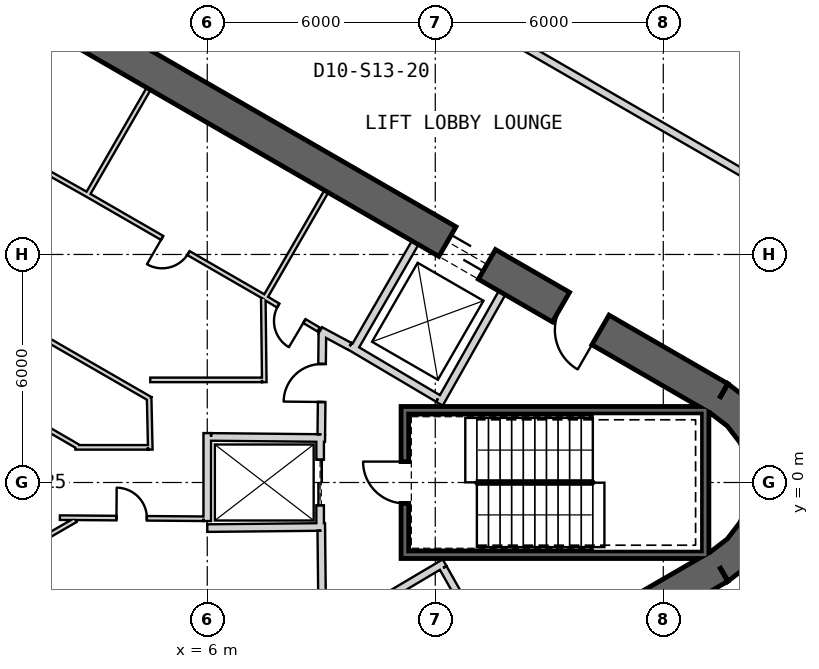
"""IFC4 building model, lengths in metres.
Left out: names, types, materials, properties, quantities, classifications, styles, units other than length and angle.
Written with IfcOpenShell. Run it as: python <this file> out.ifc"""

import sys

from ifc_helpers import new_model, si_unit, direction, frame, frame_2d, origin, place, context, subcontext, project, spatial, polyline, rectangle, outline, extrude, element, fill, save


model = new_model("IFC4")
c1 = context("Model", 3, precision=1e-05, world=origin(), true_north=direction((0.0, 1.0)))
c2 = subcontext(c1, "Body", "Model", "MODEL_VIEW")
j1 = project(units=[si_unit("LENGTHUNIT", "METRE"), si_unit("PLANEANGLEUNIT", "RADIAN")], contexts=[c1])
p1 = place(None, origin())
s1 = spatial("IfcSite", under=j1, at=p1, CompositionType="ELEMENT")
p2 = place(p1, origin())
s2 = spatial("IfcBuilding", under=s1, at=p2, CompositionType="ELEMENT")
p3 = place(p2, frame((0.0, 0.0, 217.2)))
s3 = spatial("IfcBuildingStorey", under=s2, at=p3, CompositionType="ELEMENT", Elevation=217.2)
p4 = place(p3, frame((19.475, 2.208, 0.0), z_axis=(0.0, 0.0, 1.0), x_axis=(-0.866028369851, 0.499994862586, 0.0)))
e1 = element("IfcWall", 1, at=p4, inside=s3, PredefinedType="SHEAR", context=c2, shape_type="SweptSolid", body=[
    extrude(rectangle(XDim=31.523, YDim=0.9, at=frame_2d((15.762, 0.0))), origin(), (0.0, 0.0, 1.0), 4.0),
])
p5 = place(p4, frame((7.062, 0.0, 0.0)))
e2 = element("IfcOpeningElement", 2, at=p5, cuts=e1, PredefinedType="OPENING", context=c2, shape_type="SweptSolid", body=[
    extrude(rectangle(XDim=1.2, YDim=2.4, at=frame_2d((0.6, 1.2))), frame((0.0, 0.46, 0.0), z_axis=(0.0, -1.0, 0.0), x_axis=(1.0, 0.0, 0.0)), (0.0, 0.0, 1.0), 0.92),
])
p6 = place(p4, frame((3.612, 0.0, 0.0)))
e3 = element("IfcOpeningElement", 3, at=p6, cuts=e1, PredefinedType="OPENING", context=c2, shape_type="SweptSolid", body=[
    extrude(rectangle(XDim=1.2, YDim=2.4, at=frame_2d((0.6, 1.2))), frame((0.0, 0.46, 0.0), z_axis=(0.0, -1.0, 0.0), x_axis=(1.0, 0.0, 0.0)), (0.0, 0.0, 1.0), 0.92),
])
p7 = place(p4, frame((26.712, 0.0, 0.0)))
e4 = element("IfcOpeningElement", 4, at=p7, cuts=e1, PredefinedType="OPENING", context=c2, shape_type="SweptSolid", body=[
    extrude(rectangle(XDim=1.2, YDim=2.4, at=frame_2d((0.6, 1.2))), frame((0.0, 0.46, 0.0), z_axis=(0.0, -1.0, 0.0), x_axis=(1.0, 0.0, 0.0)), (0.0, 0.0, 1.0), 0.92),
])
p8 = place(p3, frame((-7.825, -17.97, 0.0), z_axis=(0.0, 0.0, 1.0), x_axis=(0.866028369851, 0.499994862586, 0.0)))
e5 = element("IfcWall", 5, at=p8, inside=s3, PredefinedType="SHEAR", context=c2, shape_type="SweptSolid", body=[
    extrude(rectangle(XDim=31.523, YDim=0.9, at=frame_2d((15.762, 0.0))), origin(), (0.0, 0.0, 1.0), 4.0),
])
p9 = place(p8, frame((7.062, 0.0, 0.0)))
e6 = element("IfcOpeningElement", 6, at=p9, cuts=e5, PredefinedType="OPENING", context=c2, shape_type="SweptSolid", body=[
    extrude(rectangle(XDim=1.2, YDim=2.4, at=frame_2d((0.6, 1.2))), frame((0.0, 0.46, 0.0), z_axis=(0.0, -1.0, 0.0), x_axis=(1.0, 0.0, 0.0)), (0.0, 0.0, 1.0), 0.92),
])
p10 = place(p8, frame((9.762, 0.0, 0.0)))
e7 = element("IfcOpeningElement", 7, at=p10, cuts=e5, PredefinedType="OPENING", context=c2, shape_type="SweptSolid", body=[
    extrude(rectangle(XDim=1.2, YDim=2.4, at=frame_2d((0.6, 1.2))), frame((0.0, 0.46, 0.0), z_axis=(0.0, -1.0, 0.0), x_axis=(1.0, 0.0, 0.0)), (0.0, 0.0, 1.0), 0.92),
])
p11 = place(p8, frame((12.462, 0.0, 0.0)))
e8 = element("IfcOpeningElement", 8, at=p11, cuts=e5, PredefinedType="OPENING", context=c2, shape_type="SweptSolid", body=[
    extrude(rectangle(XDim=1.2, YDim=2.4, at=frame_2d((0.6, 1.2))), frame((0.0, 0.46, 0.0), z_axis=(0.0, -1.0, 0.0), x_axis=(1.0, 0.0, 0.0)), (0.0, 0.0, 1.0), 0.92),
])
p12 = place(p8, frame((15.162, 0.0, 0.0)))
e9 = element("IfcOpeningElement", 9, at=p12, cuts=e5, PredefinedType="OPENING", context=c2, shape_type="SweptSolid", body=[
    extrude(rectangle(XDim=1.2, YDim=2.4, at=frame_2d((0.6, 1.2))), frame((0.0, 0.46, 0.0), z_axis=(0.0, -1.0, 0.0), x_axis=(1.0, 0.0, 0.0)), (0.0, 0.0, 1.0), 0.92),
])
p13 = place(p8, frame((17.862, 0.0, 0.0)))
e10 = element("IfcOpeningElement", 10, at=p13, cuts=e5, PredefinedType="OPENING", context=c2, shape_type="SweptSolid", body=[
    extrude(rectangle(XDim=1.2, YDim=2.4, at=frame_2d((0.6, 1.2))), frame((0.0, 0.46, 0.0), z_axis=(0.0, -1.0, 0.0), x_axis=(1.0, 0.0, 0.0)), (0.0, 0.0, 1.0), 0.92),
])
p14 = place(p8, frame((20.562, 0.0, 0.0)))
e11 = element("IfcOpeningElement", 11, at=p14, cuts=e5, PredefinedType="OPENING", context=c2, shape_type="SweptSolid", body=[
    extrude(rectangle(XDim=1.2, YDim=2.4, at=frame_2d((0.6, 1.2))), frame((0.0, 0.46, 0.0), z_axis=(0.0, -1.0, 0.0), x_axis=(1.0, 0.0, 0.0)), (0.0, 0.0, 1.0), 0.92),
])
p15 = place(p8, frame((26.712, 0.0, 0.0)))
e12 = element("IfcOpeningElement", 12, at=p15, cuts=e5, PredefinedType="OPENING", context=c2, shape_type="SweptSolid", body=[
    extrude(rectangle(XDim=1.2, YDim=2.4, at=frame_2d((0.6, 1.2))), frame((0.0, 0.46, 0.0), z_axis=(0.0, -1.0, 0.0), x_axis=(1.0, 0.0, 0.0)), (0.0, 0.0, 1.0), 0.92),
])
p16 = place(p8, frame((3.612, 0.0, 0.0)))
e13 = element("IfcOpeningElement", 13, at=p16, cuts=e5, PredefinedType="OPENING", context=c2, shape_type="SweptSolid", body=[
    extrude(rectangle(XDim=1.2, YDim=2.4, at=frame_2d((0.6, 1.2))), frame((0.0, 0.46, 0.0), z_axis=(0.0, -1.0, 0.0), x_axis=(1.0, 0.0, 0.0)), (0.0, 0.0, 1.0), 0.92),
])
p17 = place(p3, origin())
e14 = element("IfcWall", 14, at=p17, inside=s3, PredefinedType="SHEAR", context=c2, shape_type="SweptSolid", body=[
    extrude(outline(polyline([(19.7, -2.598), (20.321, -2.121), (20.798, -1.5), (21.098, -0.777), (21.2, 0.0), (21.098, 0.777), (20.798, 1.5), (20.321, 2.121), (19.7, 2.598), (19.25, 1.819), (19.685, 1.485), (20.019, 1.05), (20.229, 0.543), (20.3, 0.0), (20.229, -0.543), (20.019, -1.05), (19.685, -1.485), (19.25, -1.819), (19.7, -2.598)])), origin(), (0.0, 0.0, 1.0), 4.0),
])
p18 = place(p3, frame((9.847, 3.495, 0.0), z_axis=(0.0, 0.0, 1.0), x_axis=(0.499984717929, 0.866034226713, 0.0)))
e15 = element("IfcWall", 15, at=p18, inside=s3, PredefinedType="PLUMBINGWALL", context=c2, shape_type="SweptSolid", body=[
    extrude(rectangle(XDim=3.25, YDim=0.2, at=frame_2d((1.625, 0.0))), origin(), (0.0, 0.0, 1.0), 3.7),
])
p19 = place(p3, frame((12.11, 2.073, 0.0), z_axis=(0.0, 0.0, 1.0), x_axis=(0.49196600604, 0.870614408852, 0.0)))
e16 = element("IfcWall", 16, at=p19, inside=s3, PredefinedType="PLUMBINGWALL", context=c2, shape_type="SweptSolid", body=[
    extrude(rectangle(XDim=3.35, YDim=0.2, at=frame_2d((1.675, 0.0))), origin(), (0.0, 0.0, 1.0), 3.7),
])
p20 = place(p3, frame((12.073, 2.211, 0.0), z_axis=(0.0, 0.0, 1.0), x_axis=(-0.860414880418, 0.509594185166, 0.0)))
e17 = element("IfcWall", 17, at=p20, inside=s3, PredefinedType="PLUMBINGWALL", context=c2, shape_type="SweptSolid", body=[
    extrude(rectangle(XDim=2.7, YDim=0.2, at=frame_2d((1.35, 0.0))), origin(), (0.0, 0.0, 1.0), 3.7),
])
p21 = place(p3, frame((19.2, 1.9, -0.3), z_axis=(0.0, 0.0, 1.0), x_axis=(-1.0, 0.0, 0.0)))
e18 = element("IfcWall", 18, at=p21, inside=s3, PredefinedType="SHEAR", context=c2, shape_type="SweptSolid", body=[
    extrude(rectangle(XDim=8.1, YDim=0.2, at=frame_2d((4.05, 0.0))), origin(), (0.0, 0.0, 1.0), 4.0),
])
p22 = place(p3, frame((19.1, -2.0, -0.3), z_axis=(0.0, 0.0, 1.0), x_axis=(0.0, 1.0, 0.0)))
e19 = element("IfcWall", 19, at=p22, inside=s3, PredefinedType="SHEAR", context=c2, shape_type="SweptSolid", body=[
    extrude(rectangle(XDim=3.8, YDim=0.2, at=frame_2d((1.9, 0.0))), origin(), (0.0, 0.0, 1.0), 4.0),
])
p23 = place(p3, frame((11.1, -1.9, -0.3), z_axis=(0.0, 0.0, 1.0), x_axis=(1.0, 0.0, 0.0)))
e20 = element("IfcWall", 20, at=p23, inside=s3, PredefinedType="SHEAR", context=c2, shape_type="SweptSolid", body=[
    extrude(rectangle(XDim=7.9, YDim=0.2, at=frame_2d((3.95, 0.0))), origin(), (0.0, 0.0, 1.0), 4.0),
])
p24 = place(p3, frame((11.2, -1.8, -0.3), z_axis=(0.0, 0.0, 1.0), x_axis=(0.0, 1.0, 0.0)))
e21 = element("IfcWall", 21, at=p24, inside=s3, PredefinedType="SHEAR", context=c2, shape_type="SweptSolid", body=[
    extrude(rectangle(XDim=3.6, YDim=0.2, at=frame_2d((1.8, 0.0))), origin(), (0.0, 0.0, 1.0), 4.0),
])
p25 = place(p24, frame((1.25, 0.0, 0.3)))
e22 = element("IfcOpeningElement", 22, at=p25, cuts=e21, PredefinedType="OPENING", context=c2, shape_type="SweptSolid", body=[
    extrude(rectangle(XDim=1.1, YDim=2.1, at=frame_2d((0.55, 1.05))), frame((0.0, 0.11, 0.0), z_axis=(0.0, -1.0, 0.0), x_axis=(1.0, 0.0, 0.0)), (0.0, 0.0, 1.0), 0.22),
])
p26 = place(p3, frame((8.97, 1.2, 0.0), z_axis=(0.0, 0.0, 1.0), x_axis=(0.0, -1.0, 0.0)))
e23 = element("IfcWall", 23, at=p26, inside=s3, PredefinedType="PLUMBINGWALL", context=c2, shape_type="SweptSolid", body=[
    extrude(rectangle(XDim=2.4, YDim=0.2, at=frame_2d((1.2, 0.0))), origin(), (0.0, 0.0, 1.0), 3.7),
])
p27 = place(p26, frame((0.6, 0.0, 0.0)))
e24 = element("IfcOpeningElement", 24, at=p27, cuts=e23, PredefinedType="OPENING", context=c2, shape_type="SweptSolid", body=[
    extrude(rectangle(XDim=1.2, YDim=2.4, at=frame_2d((0.6, 1.2))), frame((0.0, 0.11, 0.0), z_axis=(0.0, -1.0, 0.0), x_axis=(1.0, 0.0, 0.0)), (0.0, 0.0, 1.0), 0.22),
])
p28 = place(p3, frame((9.1, -1.169, 0.0), z_axis=(0.0, 0.0, 1.0), x_axis=(-0.999949988, -0.010001074852, 0.0)))
e25 = element("IfcWall", 25, at=p28, inside=s3, PredefinedType="PLUMBINGWALL", context=c2, shape_type="SweptSolid", body=[
    extrude(rectangle(XDim=3.1, YDim=0.2, at=frame_2d((1.55, 0.0))), origin(), (0.0, 0.0, 1.0), 3.7),
])
p29 = place(p3, frame((6.0, -1.014, 0.0), z_axis=(0.0, 0.0, 1.0), x_axis=(0.0, 1.0, 0.0)))
e26 = element("IfcWall", 26, at=p29, inside=s3, PredefinedType="PLUMBINGWALL", context=c2, shape_type="SweptSolid", body=[
    extrude(rectangle(XDim=2.314, YDim=0.2, at=frame_2d((1.157, 0.0))), origin(), (0.0, 0.0, 1.0), 3.7),
])
p30 = place(p3, frame((9.1, 1.169, 0.0), z_axis=(0.0, 0.0, 1.0), x_axis=(-0.99994990606, 0.010009264196, 0.0)))
e27 = element("IfcWall", 27, at=p30, inside=s3, PredefinedType="PLUMBINGWALL", context=c2, shape_type="SweptSolid", body=[
    extrude(rectangle(XDim=3.0, YDim=0.2, at=frame_2d((1.5, 0.0))), origin(), (0.0, 0.0, 1.0), 3.7),
])
p31 = place(p3, frame((7.508, 4.845, 0.0), z_axis=(0.0, 0.0, 1.0), x_axis=(0.500017246033, 0.866015446554, 0.0)))
e28 = element("IfcWall", 28, at=p31, inside=s3, PredefinedType="PARTITIONING", context=c2, shape_type="SweptSolid", body=[
    extrude(rectangle(XDim=3.25, YDim=0.12, at=frame_2d((1.625, 0.0))), origin(), (0.0, 0.0, 1.0), 3.7),
])
p32 = place(p3, frame((8.974, 3.999, 0.0), z_axis=(0.0, 0.0, 1.0), x_axis=(0.880917147855, -0.473270513147, 0.0)))
e29 = element("IfcWall", 29, at=p32, inside=s3, PredefinedType="PARTITIONING", context=c2, shape_type="SweptSolid", body=[
    extrude(rectangle(XDim=0.878, YDim=0.2, at=frame_2d((0.439, 0.0))), origin(), (0.0, 0.0, 1.0), 3.7),
])
p33 = place(p3, frame((7.493, 4.878, 0.0), z_axis=(0.0, 0.0, 1.0), x_axis=(0.8599829515, -0.510322763679, 0.0)))
e30 = element("IfcWall", 30, at=p33, inside=s3, PredefinedType="PARTITIONING", context=c2, shape_type="SweptSolid", body=[
    extrude(rectangle(XDim=1.672, YDim=0.12, at=frame_2d((0.836, 0.0))), origin(), (0.0, 0.0, 1.0), 3.7),
])
p34 = place(p33, frame((0.436, 0.0, 0.0)))
e31 = element("IfcOpeningElement", 31, at=p34, cuts=e30, PredefinedType="OPENING", context=c2, shape_type="SweptSolid", body=[
    extrude(rectangle(XDim=0.8, YDim=2.1, at=frame_2d((0.4, 1.05))), frame((0.0, 0.07, 0.0), z_axis=(0.0, -1.0, 0.0), x_axis=(1.0, 0.0, 0.0)), (0.0, 0.0, 1.0), 0.14),
])
p35 = place(p3, frame((2.832, 7.545, 0.0), z_axis=(0.0, 0.0, 1.0), x_axis=(0.500017246033, 0.866015446554, 0.0)))
e32 = element("IfcWall", 32, at=p35, inside=s3, PredefinedType="PARTITIONING", context=c2, shape_type="SweptSolid", body=[
    extrude(rectangle(XDim=3.25, YDim=0.12, at=frame_2d((1.625, 0.0))), origin(), (0.0, 0.0, 1.0), 3.7),
])
p36 = place(p3, frame((7.497, 4.886, 0.0), z_axis=(0.0, 0.0, 1.0), x_axis=(-0.866028230842, 0.499995103361, 0.0)))
e33 = element("IfcWall", 33, at=p36, inside=s3, PredefinedType="PARTITIONING", context=c2, shape_type="SweptSolid", body=[
    extrude(rectangle(XDim=5.4, YDim=0.12, at=frame_2d((2.7, 0.0))), origin(), (0.0, 0.0, 1.0), 3.7),
])
p37 = place(p36, frame((2.3, 0.0, 0.0)))
e34 = element("IfcOpeningElement", 34, at=p37, cuts=e33, PredefinedType="OPENING", context=c2, shape_type="SweptSolid", body=[
    extrude(rectangle(XDim=0.8, YDim=2.1, at=frame_2d((0.4, 1.05))), frame((0.0, 0.07, 0.0), z_axis=(0.0, -1.0, 0.0), x_axis=(1.0, 0.0, 0.0)), (0.0, 0.0, 1.0), 0.14),
])
p38 = place(p3, frame((2.821, 7.586, 0.0), z_axis=(0.0, 0.0, 1.0), x_axis=(-0.871426548871, 0.490526013503, 0.0)))
e35 = element("IfcWall", 35, at=p38, inside=s3, PredefinedType="PARTITIONING", context=c2, shape_type="SweptSolid", body=[
    extrude(rectangle(XDim=2.67, YDim=0.12, at=frame_2d((1.335, 0.0))), origin(), (0.0, 0.0, 1.0), 3.7),
])
p39 = place(p3, frame((12.245, -2.109, 0.0), z_axis=(0.0, 0.0, 1.0), x_axis=(-0.860414880418, -0.509594185166, 0.0)))
e36 = element("IfcWall", 36, at=p39, inside=s3, PredefinedType="PARTITIONING", context=c2, shape_type="SweptSolid", body=[
    extrude(rectangle(XDim=2.7, YDim=0.2, at=frame_2d((1.35, 0.0))), origin(), (0.0, 0.0, 1.0), 3.7),
])
p40 = place(p3, frame((13.758, -4.99, 0.0), z_axis=(0.0, 0.0, 1.0), x_axis=(-0.491993409184, 0.87059892334, 0.0)))
e37 = element("IfcWall", 37, at=p40, inside=s3, PredefinedType="PARTITIONING", context=c2, shape_type="SweptSolid", body=[
    extrude(rectangle(XDim=3.15, YDim=0.2, at=frame_2d((1.575, 0.0))), origin(), (0.0, 0.0, 1.0), 3.7),
])
p41 = place(p40, frame((1.175, 0.0, 0.0)))
e38 = element("IfcOpeningElement", 38, at=p41, cuts=e37, PredefinedType="OPENING", context=c2, shape_type="SweptSolid", body=[
    extrude(rectangle(XDim=0.8, YDim=2.1, at=frame_2d((0.4, 1.05))), frame((0.0, 0.11, 0.0), z_axis=(0.0, -1.0, 0.0), x_axis=(1.0, 0.0, 0.0)), (0.0, 0.0, 1.0), 0.22),
])
p42 = place(p3, frame((9.029, -3.851, 0.0), z_axis=(0.0, 0.0, 1.0), x_axis=(-0.010784614026, 0.999941844359, 0.0)))
e39 = element("IfcWall", 39, at=p42, inside=s3, PredefinedType="PARTITIONING", context=c2, shape_type="SweptSolid", body=[
    extrude(rectangle(XDim=2.581, YDim=0.2, at=frame_2d((1.291, 0.0))), origin(), (0.0, 0.0, 1.0), 3.7),
])
p43 = place(p3, frame((9.001, 1.27, 0.0), z_axis=(0.0, 0.0, 1.0), x_axis=(0.010728802716, 0.99994244474, 0.0)))
e40 = element("IfcWall", 40, at=p43, inside=s3, PredefinedType="PARTITIONING", context=c2, shape_type="SweptSolid", body=[
    extrude(rectangle(XDim=2.708, YDim=0.2, at=frame_2d((1.354, 0.0))), origin(), (0.0, 0.0, 1.0), 3.7),
])
p44 = place(p43, frame((0.848, 0.0, 0.0)))
e41 = element("IfcOpeningElement", 41, at=p44, cuts=e40, PredefinedType="OPENING", context=c2, shape_type="SweptSolid", body=[
    extrude(rectangle(XDim=1.0, YDim=2.1, at=frame_2d((0.5, 1.05))), frame((0.0, 0.11, 0.0), z_axis=(0.0, -1.0, 0.0), x_axis=(1.0, 0.0, 0.0)), (0.0, 0.0, 1.0), 0.22),
])
p45 = place(p3, frame((2.532, -0.988, 0.0), z_axis=(0.0, 0.0, 1.0), x_axis=(-0.866023141178, -0.500003918929, 0.0)))
e42 = element("IfcWall", 42, at=p45, inside=s3, PredefinedType="PARTITIONING", context=c2, shape_type="SweptSolid", body=[
    extrude(rectangle(XDim=3.404, YDim=0.12, at=frame_2d((1.702, 0.0))), origin(), (0.0, 0.0, 1.0), 3.7),
])
p46 = place(p3, frame((5.9, -0.954, 0.0), z_axis=(0.0, 0.0, 1.0), x_axis=(-0.999970929415, 0.00762498027, 0.0)))
e43 = element("IfcWall", 43, at=p46, inside=s3, PredefinedType="PARTITIONING", context=c2, shape_type="SweptSolid", body=[
    extrude(rectangle(XDim=3.778, YDim=0.12, at=frame_2d((1.889, 0.0))), origin(), (0.0, 0.0, 1.0), 3.7),
])
p47 = place(p46, frame((1.489, 0.0, 0.0)))
e44 = element("IfcOpeningElement", 44, at=p47, cuts=e43, PredefinedType="OPENING", context=c2, shape_type="SweptSolid", body=[
    extrude(rectangle(XDim=0.8, YDim=2.1, at=frame_2d((0.4, 1.05))), frame((0.0, 0.07, 0.0), z_axis=(0.0, -1.0, 0.0), x_axis=(1.0, 0.0, 0.0)), (0.0, 0.0, 1.0), 0.14),
])
p48 = place(p3, frame((-0.351, 4.994, 0.0), z_axis=(0.0, 0.0, 1.0), x_axis=(0.866277754418, -0.499562660935, 0.0)))
e45 = element("IfcWall", 45, at=p48, inside=s3, PredefinedType="PARTITIONING", context=c2, shape_type="SweptSolid", body=[
    extrude(rectangle(XDim=5.6, YDim=0.12, at=frame_2d((2.8, 0.0))), origin(), (0.0, 0.0, 1.0), 3.7),
])
p49 = place(p3, frame((4.501, 0.865, 0.0), z_axis=(0.0, 0.0, 1.0), x_axis=(-0.022315079617, 0.999750987607, 0.0)))
e46 = element("IfcWall", 46, at=p49, inside=s3, PredefinedType="PARTITIONING", context=c2, shape_type="SweptSolid", body=[
    extrude(rectangle(XDim=1.378, YDim=0.12, at=frame_2d((0.689, 0.0))), origin(), (0.0, 0.0, 1.0), 3.7),
])
p50 = place(p3, frame((2.53, 0.925, 0.0), z_axis=(0.0, 0.0, 1.0), x_axis=(1.0, 0.0, 0.0)))
e47 = element("IfcWall", 47, at=p50, inside=s3, PredefinedType="PARTITIONING", context=c2, shape_type="SweptSolid", body=[
    extrude(rectangle(XDim=1.91, YDim=0.12, at=frame_2d((0.955, 0.0))), origin(), (0.0, 0.0, 1.0), 3.7),
])
p51 = place(p3, frame((-0.416, 2.691, 0.0), z_axis=(0.0, 0.0, 1.0), x_axis=(0.865413570885, -0.501058231473, 0.0)))
e48 = element("IfcWall", 48, at=p51, inside=s3, PredefinedType="PARTITIONING", context=c2, shape_type="SweptSolid", body=[
    extrude(rectangle(XDim=3.506, YDim=0.12, at=frame_2d((1.753, 0.0))), origin(), (0.0, 0.0, 1.0), 3.7),
])
p52 = place(p51, frame((1.594, 0.0, 0.0)))
e49 = element("IfcOpeningElement", 49, at=p52, cuts=e48, PredefinedType="OPENING", context=c2, shape_type="SweptSolid", body=[
    extrude(rectangle(XDim=0.8, YDim=2.1, at=frame_2d((0.4, 1.05))), frame((0.0, 0.07, 0.0), z_axis=(0.0, -1.0, 0.0), x_axis=(1.0, 0.0, 0.0)), (0.0, 0.0, 1.0), 0.14),
])
p53 = place(p3, frame((7.501, 2.64, 0.0), z_axis=(0.0, 0.0, 1.0), x_axis=(-0.01174194727, 0.999931060961, 0.0)))
e50 = element("IfcWall", 50, at=p53, inside=s3, PredefinedType="PARTITIONING", context=c2, shape_type="SweptSolid", body=[
    extrude(rectangle(XDim=2.225, YDim=0.12, at=frame_2d((1.112, 0.0))), origin(), (0.0, 0.0, 1.0), 3.7),
])
p54 = place(p3, frame((4.5, 2.7, 0.0), z_axis=(0.0, 0.0, 1.0), x_axis=(1.0, 0.0, 0.0)))
e51 = element("IfcWall", 51, at=p54, inside=s3, PredefinedType="PARTITIONING", context=c2, shape_type="SweptSolid", body=[
    extrude(rectangle(XDim=2.94, YDim=0.12, at=frame_2d((1.47, 0.0))), origin(), (0.0, 0.0, 1.0), 3.7),
])
p55 = place(p3, frame((23.119, 6.398, 0.0), z_axis=(0.0, 0.0, 1.0), x_axis=(-0.866027821991, 0.499995811521, 0.0)))
e52 = element("IfcWall", 52, at=p55, inside=s3, PredefinedType="PARTITIONING", context=c2, shape_type="SweptSolid", body=[
    extrude(rectangle(XDim=12.473, YDim=0.2, at=frame_2d((6.236, 0.0))), origin(), (0.0, 0.0, 1.0), 2.88),
])
p56 = place(p25, origin())
e53 = element("IfcDoor", 53, at=p56, inside=s3, OperationType="SINGLE_SWING_LEFT", PredefinedType="USERDEFINED", context=c2, shape_type="SweptSolid", body=[
    extrude(rectangle(XDim=1.1, YDim=2.1, at=frame_2d((0.55, 1.05))), frame((0.0, 0.025, 0.0), z_axis=(0.0, -1.0, 0.0), x_axis=(1.0, 0.0, 0.0)), (0.0, 0.0, 1.0), 0.05),
])
fill(e22, e53)
p57 = place(p44, origin())
e54 = element("IfcDoor", 54, at=p57, inside=s3, OperationType="SINGLE_SWING_RIGHT", PredefinedType="USERDEFINED", context=c2, shape_type="SweptSolid", body=[
    extrude(rectangle(XDim=1.0, YDim=2.1, at=frame_2d((0.5, 1.05))), frame((0.0, 0.025, 0.0), z_axis=(0.0, -1.0, 0.0), x_axis=(1.0, 0.0, 0.0)), (0.0, 0.0, 1.0), 0.05),
])
fill(e41, e54)
p58 = place(p27, origin())
e55 = element("IfcDoor", 55, at=p58, inside=s3, OperationType="SLIDING_TO_LEFT", PredefinedType="USERDEFINED", context=c2, shape_type="SweptSolid", body=[
    extrude(rectangle(XDim=1.2, YDim=2.4, at=frame_2d((0.6, 1.2))), frame((0.0, 0.025, 0.0), z_axis=(0.0, -1.0, 0.0), x_axis=(1.0, 0.0, 0.0)), (0.0, 0.0, 1.0), 0.05),
])
fill(e24, e55)
p59 = place(p47, origin())
e56 = element("IfcDoor", 56, at=p59, inside=s3, OperationType="SINGLE_SWING_LEFT", PredefinedType="USERDEFINED", context=c2, shape_type="SweptSolid", body=[
    extrude(rectangle(XDim=0.8, YDim=2.1, at=frame_2d((0.4, 1.05))), frame((0.0, 0.025, 0.0), z_axis=(0.0, -1.0, 0.0), x_axis=(1.0, 0.0, 0.0)), (0.0, 0.0, 1.0), 0.05),
])
fill(e44, e56)
p60 = place(p34, origin())
e57 = element("IfcDoor", 57, at=p60, inside=s3, OperationType="SINGLE_SWING_RIGHT", PredefinedType="USERDEFINED", context=c2, shape_type="SweptSolid", body=[
    extrude(rectangle(XDim=0.8, YDim=2.1, at=frame_2d((0.4, 1.05))), frame((0.0, 0.025, 0.0), z_axis=(0.0, -1.0, 0.0), x_axis=(1.0, 0.0, 0.0)), (0.0, 0.0, 1.0), 0.05),
])
fill(e31, e57)
p61 = place(p37, origin())
e58 = element("IfcDoor", 58, at=p61, inside=s3, OperationType="SINGLE_SWING_LEFT", PredefinedType="USERDEFINED", context=c2, shape_type="SweptSolid", body=[
    extrude(rectangle(XDim=0.8, YDim=2.1, at=frame_2d((0.4, 1.05))), frame((0.0, 0.025, 0.0), z_axis=(0.0, -1.0, 0.0), x_axis=(1.0, 0.0, 0.0)), (0.0, 0.0, 1.0), 0.05),
])
fill(e34, e58)
p62 = place(p5, origin())
e59 = element("IfcDoor", 59, at=p62, inside=s3, OperationType="SLIDING_TO_LEFT", PredefinedType="USERDEFINED", context=c2, shape_type="SweptSolid", body=[
    extrude(rectangle(XDim=1.2, YDim=2.4, at=frame_2d((0.6, 1.2))), frame((0.0, 0.025, 0.0), z_axis=(0.0, -1.0, 0.0), x_axis=(1.0, 0.0, 0.0)), (0.0, 0.0, 1.0), 0.05),
])
fill(e2, e59)
p63 = place(p6, origin())
e60 = element("IfcDoor", 60, at=p63, inside=s3, OperationType="SINGLE_SWING_LEFT", PredefinedType="USERDEFINED", context=c2, shape_type="SweptSolid", body=[
    extrude(rectangle(XDim=1.2, YDim=2.4, at=frame_2d((0.6, 1.2))), frame((0.0, 0.025, 0.0), z_axis=(0.0, -1.0, 0.0), x_axis=(1.0, 0.0, 0.0)), (0.0, 0.0, 1.0), 0.05),
])
fill(e3, e60)
save(model, sys.argv[1])
